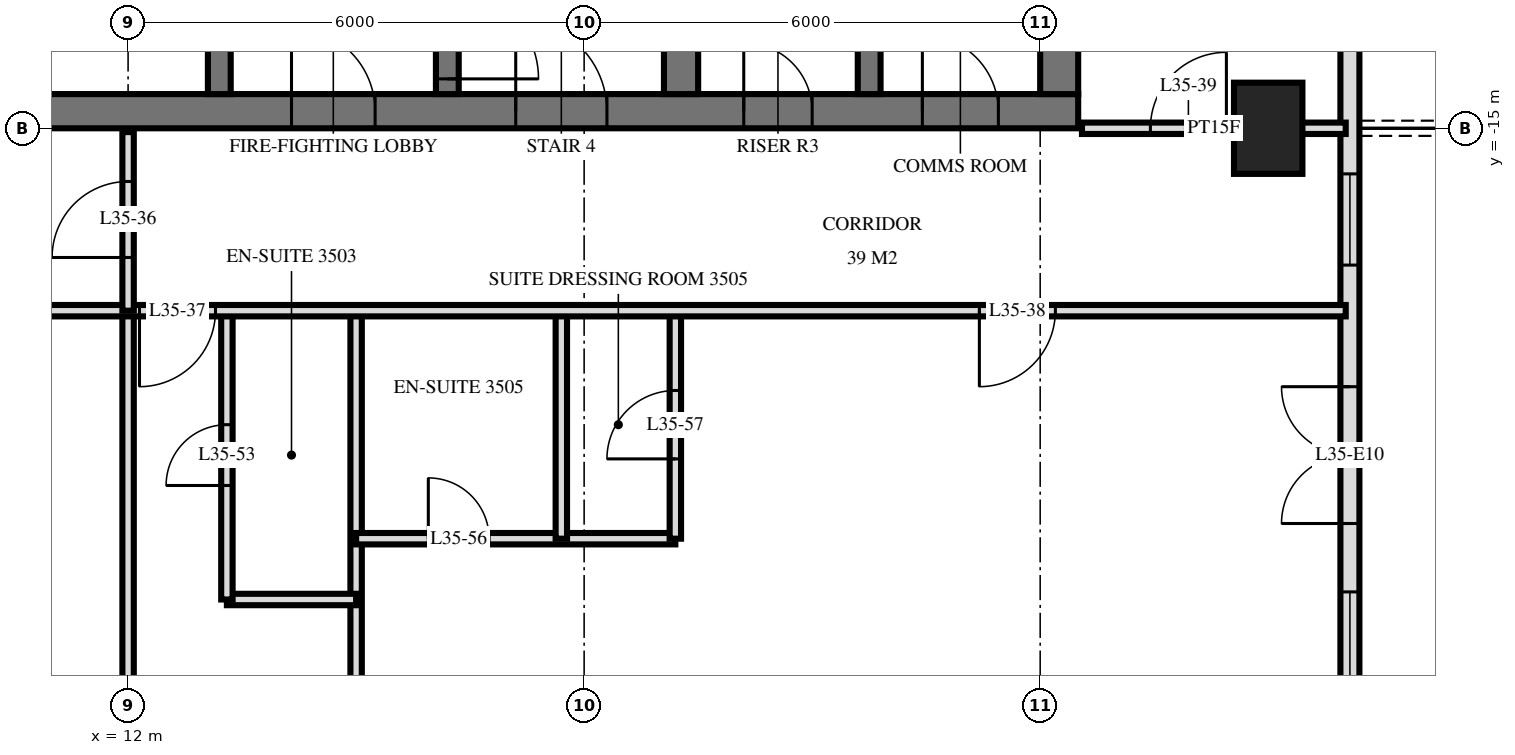
"""IFC4 building model, lengths in metres.
Left out: names, types, materials, properties, quantities, classifications, styles, units other than length and angle.
Written with IfcOpenShell. Run it as: python <this file> out.ifc"""

import sys

from ifc_helpers import new_model, si_unit, direction, frame, frame_2d, origin, origin_2d, place, context, subcontext, project, spatial, rectangle, extrude, element, fill, save


model = new_model("IFC4")
c1 = context("Model", 3, precision=1e-05, world=origin(), true_north=direction((0.0, 1.0)))
c2 = subcontext(c1, "Body", "Model", "MODEL_VIEW")
j1 = project(units=[si_unit("LENGTHUNIT", "METRE"), si_unit("PLANEANGLEUNIT", "RADIAN")], contexts=[c1])
p1 = place(None, origin())
s1 = spatial("IfcSite", under=j1, at=p1, CompositionType="ELEMENT")
p2 = place(p1, origin())
s2 = spatial("IfcBuilding", under=s1, at=p2, CompositionType="ELEMENT")
p3 = place(p2, frame((0.0, 0.0, 138.0)))
s3 = spatial("IfcBuildingStorey", under=s2, at=p3, CompositionType="ELEMENT", Elevation=138.0)
p4 = place(p3, frame((27.0, -15.0, 0.0), z_axis=(0.0, 0.0, 1.0), x_axis=(0.0, 1.0, 0.0)))
e1 = element("IfcColumn", 1, at=p4, inside=s3, PredefinedType="COLUMN", context=c2, shape_type="SweptSolid", body=[
    extrude(rectangle(XDim=1.2, YDim=0.9, at=origin_2d()), origin(), (0.0, 0.0, 1.0), 3.6),
])
p5 = place(p3, frame((10.0, -14.775, 0.0), z_axis=(0.0, 0.0, 1.0), x_axis=(1.0, 0.0, 0.0)))
e2 = element("IfcWall", 2, at=p5, inside=s3, PredefinedType="SHEAR", context=c2, shape_type="SweptSolid", body=[
    extrude(rectangle(XDim=14.5, YDim=0.45, at=frame_2d((7.25, 0.0))), origin(), (0.0, 0.0, 1.0), 3.6),
])
p6 = place(p5, frame((7.1, 0.0, 0.0)))
e3 = element("IfcOpeningElement", 3, at=p6, cuts=e2, PredefinedType="OPENING", context=c2, shape_type="SweptSolid", body=[
    extrude(rectangle(XDim=1.2, YDim=2.1, at=frame_2d((0.6, 1.05))), frame((0.0, 0.235, 0.0), z_axis=(0.0, -1.0, 0.0), x_axis=(1.0, 0.0, 0.0)), (0.0, 0.0, 1.0), 0.47),
])
p7 = place(p5, frame((4.15, 0.0, 0.0)))
e4 = element("IfcOpeningElement", 4, at=p7, cuts=e2, PredefinedType="OPENING", context=c2, shape_type="SweptSolid", body=[
    extrude(rectangle(XDim=1.1, YDim=2.1, at=frame_2d((0.55, 1.05))), frame((0.0, 0.235, 0.0), z_axis=(0.0, -1.0, 0.0), x_axis=(1.0, 0.0, 0.0)), (0.0, 0.0, 1.0), 0.47),
])
p8 = place(p5, frame((10.1, 0.0, 0.0)))
e5 = element("IfcOpeningElement", 5, at=p8, cuts=e2, PredefinedType="OPENING", context=c2, shape_type="SweptSolid", body=[
    extrude(rectangle(XDim=0.9, YDim=2.1, at=frame_2d((0.45, 1.05))), frame((0.0, 0.235, 0.0), z_axis=(0.0, -1.0, 0.0), x_axis=(1.0, 0.0, 0.0)), (0.0, 0.0, 1.0), 0.47),
])
p9 = place(p5, frame((12.45, 0.0, 0.0)))
e6 = element("IfcOpeningElement", 6, at=p9, cuts=e2, PredefinedType="OPENING", context=c2, shape_type="SweptSolid", body=[
    extrude(rectangle(XDim=1.0, YDim=2.1, at=frame_2d((0.5, 1.05))), frame((0.0, 0.235, 0.0), z_axis=(0.0, -1.0, 0.0), x_axis=(1.0, 0.0, 0.0)), (0.0, 0.0, 1.0), 0.47),
])
p10 = place(p3, frame((24.25, -14.55, 0.0), z_axis=(0.0, 0.0, 1.0), x_axis=(0.0, 1.0, 0.0)))
e7 = element("IfcWall", 7, at=p10, inside=s3, PredefinedType="SHEAR", context=c2, shape_type="SweptSolid", body=[
    extrude(rectangle(XDim=14.1, YDim=0.5, at=frame_2d((7.05, 0.0))), origin(), (0.0, 0.0, 1.0), 3.6),
])
p11 = place(p3, frame((13.2, -14.55, 0.0), z_axis=(0.0, 0.0, 1.0), x_axis=(0.0, 1.0, 0.0)))
e8 = element("IfcWall", 8, at=p11, inside=s3, PredefinedType="SHEAR", context=c2, shape_type="SweptSolid", body=[
    extrude(rectangle(XDim=5.4, YDim=0.3, at=frame_2d((2.7, 0.0))), origin(), (0.0, 0.0, 1.0), 3.6),
])
p12 = place(p11, frame((4.0, 0.0, 0.0)))
e9 = element("IfcOpeningElement", 9, at=p12, cuts=e8, PredefinedType="OPENING", context=c2, shape_type="SweptSolid", body=[
    extrude(rectangle(XDim=1.2, YDim=2.1, at=frame_2d((0.6, 1.05))), frame((0.0, 0.16, 0.0), z_axis=(0.0, -1.0, 0.0), x_axis=(1.0, 0.0, 0.0)), (0.0, 0.0, 1.0), 0.32),
])
p13 = place(p3, frame((16.2, -14.55, 0.0), z_axis=(0.0, 0.0, 1.0), x_axis=(0.0, 1.0, 0.0)))
e10 = element("IfcWall", 10, at=p13, inside=s3, PredefinedType="SHEAR", context=c2, shape_type="SweptSolid", body=[
    extrude(rectangle(XDim=5.4, YDim=0.3, at=frame_2d((2.7, 0.0))), origin(), (0.0, 0.0, 1.0), 3.6),
])
p14 = place(p13, frame((0.2, 0.0, 0.0)))
e11 = element("IfcOpeningElement", 11, at=p14, cuts=e10, PredefinedType="OPENING", context=c2, shape_type="SweptSolid", body=[
    extrude(rectangle(XDim=1.2, YDim=2.1, at=frame_2d((0.6, 1.05))), frame((0.0, 0.16, 0.0), z_axis=(0.0, -1.0, 0.0), x_axis=(1.0, 0.0, 0.0)), (0.0, 0.0, 1.0), 0.32),
])
p15 = place(p3, frame((19.275, -14.55, 0.0), z_axis=(0.0, 0.0, 1.0), x_axis=(0.0, 1.0, 0.0)))
e12 = element("IfcWall", 12, at=p15, inside=s3, PredefinedType="SHEAR", context=c2, shape_type="SweptSolid", body=[
    extrude(rectangle(XDim=5.4, YDim=0.45, at=frame_2d((2.7, 0.0))), origin(), (0.0, 0.0, 1.0), 3.6),
])
p16 = place(p3, frame((21.75, -14.55, 0.0), z_axis=(0.0, 0.0, 1.0), x_axis=(0.0, 1.0, 0.0)))
e13 = element("IfcWall", 13, at=p16, inside=s3, PredefinedType="SHEAR", context=c2, shape_type="SweptSolid", body=[
    extrude(rectangle(XDim=5.4, YDim=0.3, at=frame_2d((2.7, 0.0))), origin(), (0.0, 0.0, 1.0), 3.6),
])
p17 = place(p3, frame((28.075, -29.275, 0.0), z_axis=(0.0, 0.0, 1.0), x_axis=(0.0, 1.0, 0.0)))
e14 = element("IfcWall", 14, at=p17, inside=s3, PredefinedType="SOLIDWALL", context=c2, shape_type="SweptSolid", body=[
    extrude(rectangle(XDim=25.951, YDim=0.25, at=frame_2d((12.975, 0.0))), origin(), (0.0, 0.0, 1.0), 3.32),
])
p18 = place(p17, frame((0.575, 0.0, 0.0)))
e15 = element("IfcOpeningElement", 15, at=p18, cuts=e14, PredefinedType="OPENING", context=c2, shape_type="SweptSolid", body=[
    extrude(rectangle(XDim=1.8, YDim=2.4, at=frame_2d((0.9, 1.2))), frame((0.0, 0.135, 0.0), z_axis=(0.0, -1.0, 0.0), x_axis=(1.0, 0.0, 0.0)), (0.0, 0.0, 1.0), 0.27),
])
p19 = place(p17, frame((3.325, 0.0, 0.3)))
e16 = element("IfcOpeningElement", 16, at=p19, cuts=e14, PredefinedType="OPENING", context=c2, shape_type="SweptSolid", body=[
    extrude(rectangle(XDim=1.8, YDim=2.1, at=frame_2d((0.9, 1.05))), frame((0.0, 0.135, 0.0), z_axis=(0.0, -1.0, 0.0), x_axis=(1.0, 0.0, 0.0)), (0.0, 0.0, 1.0), 0.27),
])
p20 = place(p17, frame((5.775, 0.0, 0.3)))
e17 = element("IfcOpeningElement", 17, at=p20, cuts=e14, PredefinedType="OPENING", context=c2, shape_type="SweptSolid", body=[
    extrude(rectangle(XDim=2.4, YDim=2.1, at=frame_2d((1.2, 1.05))), frame((0.0, 0.135, 0.0), z_axis=(0.0, -1.0, 0.0), x_axis=(1.0, 0.0, 0.0)), (0.0, 0.0, 1.0), 0.27),
])
p21 = place(p17, frame((9.075, 0.0, 0.0)))
e18 = element("IfcOpeningElement", 18, at=p21, cuts=e14, PredefinedType="OPENING", context=c2, shape_type="SweptSolid", body=[
    extrude(rectangle(XDim=1.8, YDim=2.4, at=frame_2d((0.9, 1.2))), frame((0.0, 0.135, 0.0), z_axis=(0.0, -1.0, 0.0), x_axis=(1.0, 0.0, 0.0)), (0.0, 0.0, 1.0), 0.27),
])
p22 = place(p17, frame((12.475, 0.0, 0.3)))
e19 = element("IfcOpeningElement", 19, at=p22, cuts=e14, PredefinedType="OPENING", context=c2, shape_type="SweptSolid", body=[
    extrude(rectangle(XDim=1.2, YDim=2.1, at=frame_2d((0.6, 1.05))), frame((0.0, 0.135, 0.0), z_axis=(0.0, -1.0, 0.0), x_axis=(1.0, 0.0, 0.0)), (0.0, 0.0, 1.0), 0.27),
])
p23 = place(p17, frame((17.5, 0.0, 0.0)))
e20 = element("IfcOpeningElement", 20, at=p23, cuts=e14, PredefinedType="OPENING", context=c2, shape_type="SweptSolid", body=[
    extrude(rectangle(XDim=1.8, YDim=2.4, at=frame_2d((0.9, 1.2))), frame((0.0, 0.135, 0.0), z_axis=(0.0, -1.0, 0.0), x_axis=(1.0, 0.0, 0.0)), (0.0, 0.0, 1.0), 0.27),
])
p24 = place(p3, frame((19.2, -20.4, 0.0), z_axis=(0.0, 0.0, 1.0), x_axis=(0.0, 1.0, 0.0)))
e21 = element("IfcWall", 21, at=p24, inside=s3, PredefinedType="PARTITIONING", context=c2, shape_type="SweptSolid", body=[
    extrude(rectangle(XDim=3.0, YDim=0.15, at=frame_2d((1.5, 0.0))), origin(), (0.0, 0.0, 1.0), 3.32),
])
p25 = place(p24, frame((1.05, 0.0, 0.0)))
e22 = element("IfcOpeningElement", 22, at=p25, cuts=e21, PredefinedType="OPENING", context=c2, shape_type="SweptSolid", body=[
    extrude(rectangle(XDim=0.9, YDim=2.1, at=frame_2d((0.45, 1.05))), frame((0.0, 0.085, 0.0), z_axis=(0.0, -1.0, 0.0), x_axis=(1.0, 0.0, 0.0)), (0.0, 0.0, 1.0), 0.17),
])
p26 = place(p3, frame((17.7, -20.4, 0.0), z_axis=(0.0, 0.0, 1.0), x_axis=(0.0, 1.0, 0.0)))
e23 = element("IfcWall", 23, at=p26, inside=s3, PredefinedType="PARTITIONING", context=c2, shape_type="SweptSolid", body=[
    extrude(rectangle(XDim=3.0, YDim=0.15, at=frame_2d((1.5, 0.0))), origin(), (0.0, 0.0, 1.0), 3.32),
])
p27 = place(p3, frame((15.0, -33.62, 0.0), z_axis=(0.0, 0.0, 1.0), x_axis=(0.0, 1.0, 0.0)))
e24 = element("IfcWall", 24, at=p27, inside=s3, PredefinedType="PARTITIONING", context=c2, shape_type="SweptSolid", body=[
    extrude(rectangle(XDim=16.22, YDim=0.15, at=frame_2d((8.11, 0.0))), origin(), (0.0, 0.0, 1.0), 3.32),
])
p28 = place(p3, frame((13.3, -21.2, 0.0), z_axis=(0.0, 0.0, 1.0), x_axis=(0.0, 1.0, 0.0)))
e25 = element("IfcWall", 25, at=p28, inside=s3, PredefinedType="PARTITIONING", context=c2, shape_type="SweptSolid", body=[
    extrude(rectangle(XDim=3.8, YDim=0.15, at=frame_2d((1.9, 0.0))), origin(), (0.0, 0.0, 1.0), 3.32),
])
p29 = place(p28, frame((1.5, 0.0, 0.0)))
e26 = element("IfcOpeningElement", 26, at=p29, cuts=e25, PredefinedType="OPENING", context=c2, shape_type="SweptSolid", body=[
    extrude(rectangle(XDim=0.8, YDim=2.1, at=frame_2d((0.4, 1.05))), frame((0.0, 0.085, 0.0), z_axis=(0.0, -1.0, 0.0), x_axis=(1.0, 0.0, 0.0)), (0.0, 0.0, 1.0), 0.17),
])
p30 = place(p3, frame((12.0, -17.4, 0.0), z_axis=(0.0, 0.0, 1.0), x_axis=(0.0, 1.0, 0.0)))
e27 = element("IfcWall", 27, at=p30, inside=s3, PredefinedType="PARTITIONING", context=c2, shape_type="SweptSolid", body=[
    extrude(rectangle(XDim=2.35, YDim=0.15, at=frame_2d((1.175, 0.0))), origin(), (0.0, 0.0, 1.0), 3.32),
])
p31 = place(p30, frame((0.7, 0.0, 0.0)))
e28 = element("IfcOpeningElement", 28, at=p31, cuts=e27, PredefinedType="OPENING", context=c2, shape_type="SweptSolid", body=[
    extrude(rectangle(XDim=1.0, YDim=2.1, at=frame_2d((0.5, 1.05))), frame((0.0, 0.085, 0.0), z_axis=(0.0, -1.0, 0.0), x_axis=(1.0, 0.0, 0.0)), (0.0, 0.0, 1.0), 0.17),
])
p32 = place(p3, frame((12.0, -33.62, 0.0), z_axis=(0.0, 0.0, 1.0), x_axis=(0.0, 1.0, 0.0)))
e29 = element("IfcWall", 29, at=p32, inside=s3, PredefinedType="PARTITIONING", context=c2, shape_type="SweptSolid", body=[
    extrude(rectangle(XDim=16.22, YDim=0.15, at=frame_2d((8.11, 0.0))), origin(), (0.0, 0.0, 1.0), 3.32),
])
p33 = place(p3, frame((13.3, -21.2, 0.0), z_axis=(0.0, 0.0, 1.0), x_axis=(1.0, 0.0, 0.0)))
e30 = element("IfcWall", 30, at=p33, inside=s3, PredefinedType="PARTITIONING", context=c2, shape_type="SweptSolid", body=[
    extrude(rectangle(XDim=1.7, YDim=0.15, at=frame_2d((0.85, 0.0))), origin(), (0.0, 0.0, 1.0), 3.32),
])
p34 = place(p3, frame((15.0, -20.4, 0.0), z_axis=(0.0, 0.0, 1.0), x_axis=(1.0, 0.0, 0.0)))
e31 = element("IfcWall", 31, at=p34, inside=s3, PredefinedType="PARTITIONING", context=c2, shape_type="SweptSolid", body=[
    extrude(rectangle(XDim=4.2, YDim=0.15, at=frame_2d((2.1, 0.0))), origin(), (0.0, 0.0, 1.0), 3.32),
])
p35 = place(p34, frame((0.95, 0.0, 0.0)))
e32 = element("IfcOpeningElement", 32, at=p35, cuts=e31, PredefinedType="OPENING", context=c2, shape_type="SweptSolid", body=[
    extrude(rectangle(XDim=0.8, YDim=2.1, at=frame_2d((0.4, 1.05))), frame((0.0, 0.085, 0.0), z_axis=(0.0, -1.0, 0.0), x_axis=(1.0, 0.0, 0.0)), (0.0, 0.0, 1.0), 0.17),
])
p36 = place(p3, frame((-28.02, -17.4, 0.0), z_axis=(0.0, 0.0, 1.0), x_axis=(1.0, 0.0, 0.0)))
e33 = element("IfcWall", 33, at=p36, inside=s3, PredefinedType="PARTITIONING", context=c2, shape_type="SweptSolid", body=[
    extrude(rectangle(XDim=56.04, YDim=0.15, at=frame_2d((28.02, 0.0))), origin(), (0.0, 0.0, 1.0), 3.32),
])
p37 = place(p36, frame((13.17, 0.0, 0.0)))
e34 = element("IfcOpeningElement", 34, at=p37, cuts=e33, PredefinedType="OPENING", context=c2, shape_type="SweptSolid", body=[
    extrude(rectangle(XDim=1.0, YDim=2.1, at=frame_2d((0.5, 1.05))), frame((0.0, 0.085, 0.0), z_axis=(0.0, -1.0, 0.0), x_axis=(1.0, 0.0, 0.0)), (0.0, 0.0, 1.0), 0.17),
])
p38 = place(p36, frame((11.87, 0.0, 0.0)))
e35 = element("IfcOpeningElement", 35, at=p38, cuts=e33, PredefinedType="OPENING", context=c2, shape_type="SweptSolid", body=[
    extrude(rectangle(XDim=1.0, YDim=2.1, at=frame_2d((0.5, 1.05))), frame((0.0, 0.085, 0.0), z_axis=(0.0, -1.0, 0.0), x_axis=(1.0, 0.0, 0.0)), (0.0, 0.0, 1.0), 0.17),
])
p39 = place(p36, frame((2.32, 0.0, 0.0)))
e36 = element("IfcOpeningElement", 36, at=p39, cuts=e33, PredefinedType="OPENING", context=c2, shape_type="SweptSolid", body=[
    extrude(rectangle(XDim=1.0, YDim=2.1, at=frame_2d((0.5, 1.05))), frame((0.0, 0.085, 0.0), z_axis=(0.0, -1.0, 0.0), x_axis=(1.0, 0.0, 0.0)), (0.0, 0.0, 1.0), 0.17),
])
p40 = place(p36, frame((40.17, 0.0, 0.0)))
e37 = element("IfcOpeningElement", 37, at=p40, cuts=e33, PredefinedType="OPENING", context=c2, shape_type="SweptSolid", body=[
    extrude(rectangle(XDim=1.0, YDim=2.1, at=frame_2d((0.5, 1.05))), frame((0.0, 0.085, 0.0), z_axis=(0.0, -1.0, 0.0), x_axis=(1.0, 0.0, 0.0)), (0.0, 0.0, 1.0), 0.17),
])
p41 = place(p36, frame((51.22, 0.0, 0.0)))
e38 = element("IfcOpeningElement", 38, at=p41, cuts=e33, PredefinedType="OPENING", context=c2, shape_type="SweptSolid", body=[
    extrude(rectangle(XDim=1.0, YDim=2.1, at=frame_2d((0.5, 1.05))), frame((0.0, 0.085, 0.0), z_axis=(0.0, -1.0, 0.0), x_axis=(1.0, 0.0, 0.0)), (0.0, 0.0, 1.0), 0.17),
])
p42 = place(p36, frame((18.52, 0.0, 0.0)))
e39 = element("IfcOpeningElement", 39, at=p42, cuts=e33, PredefinedType="OPENING", context=c2, shape_type="SweptSolid", body=[
    extrude(rectangle(XDim=1.0, YDim=2.1, at=frame_2d((0.5, 1.05))), frame((0.0, 0.085, 0.0), z_axis=(0.0, -1.0, 0.0), x_axis=(1.0, 0.0, 0.0)), (0.0, 0.0, 1.0), 0.17),
])
p43 = place(p36, frame((26.02, 0.0, 0.0)))
e40 = element("IfcOpeningElement", 40, at=p43, cuts=e33, PredefinedType="OPENING", context=c2, shape_type="SweptSolid", body=[
    extrude(rectangle(XDim=1.0, YDim=2.1, at=frame_2d((0.5, 1.05))), frame((0.0, 0.085, 0.0), z_axis=(0.0, -1.0, 0.0), x_axis=(1.0, 0.0, 0.0)), (0.0, 0.0, 1.0), 0.17),
])
p44 = place(p36, frame((35.02, 0.0, 0.0)))
e41 = element("IfcOpeningElement", 41, at=p44, cuts=e33, PredefinedType="OPENING", context=c2, shape_type="SweptSolid", body=[
    extrude(rectangle(XDim=1.0, YDim=2.1, at=frame_2d((0.5, 1.05))), frame((0.0, 0.085, 0.0), z_axis=(0.0, -1.0, 0.0), x_axis=(1.0, 0.0, 0.0)), (0.0, 0.0, 1.0), 0.17),
])
p45 = place(p3, frame((24.55, -15.0, 0.0), z_axis=(0.0, 0.0, 1.0), x_axis=(1.0, 0.0, 0.0)))
e42 = element("IfcWall", 42, at=p45, inside=s3, PredefinedType="PARTITIONING", context=c2, shape_type="SweptSolid", body=[
    extrude(rectangle(XDim=3.47, YDim=0.15, at=frame_2d((1.735, 0.0))), origin(), (0.0, 0.0, 1.0), 3.32),
])
p46 = place(p45, frame((0.9, 0.0, 0.0)))
e43 = element("IfcOpeningElement", 43, at=p46, cuts=e42, PredefinedType="OPENING", context=c2, shape_type="SweptSolid", body=[
    extrude(rectangle(XDim=1.0, YDim=2.1, at=frame_2d((0.5, 1.05))), frame((0.0, 0.085, 0.0), z_axis=(0.0, -1.0, 0.0), x_axis=(1.0, 0.0, 0.0)), (0.0, 0.0, 1.0), 0.17),
])
p47 = place(p20, origin())
e44 = element("IfcWindow", 44, at=p47, inside=s3, PartitioningType="SINGLE_PANEL", PredefinedType="WINDOW", context=c2, shape_type="SweptSolid", body=[
    extrude(rectangle(XDim=2.4, YDim=2.1, at=frame_2d((1.2, 1.05))), frame((0.0, 0.03, 0.0), z_axis=(0.0, -1.0, 0.0), x_axis=(1.0, 0.0, 0.0)), (0.0, 0.0, 1.0), 0.06),
])
fill(e17, e44)
p48 = place(p21, origin())
e45 = element("IfcDoor", 45, at=p48, inside=s3, OperationType="DOUBLE_DOOR_SINGLE_SWING", PredefinedType="DOOR", context=c2, shape_type="SweptSolid", body=[
    extrude(rectangle(XDim=1.8, YDim=2.4, at=frame_2d((0.9, 1.2))), frame((0.0, 0.025, 0.0), z_axis=(0.0, -1.0, 0.0), x_axis=(1.0, 0.0, 0.0)), (0.0, 0.0, 1.0), 0.05),
])
fill(e18, e45)
p49 = place(p22, origin())
e46 = element("IfcWindow", 46, at=p49, inside=s3, PartitioningType="SINGLE_PANEL", PredefinedType="WINDOW", context=c2, shape_type="SweptSolid", body=[
    extrude(rectangle(XDim=1.2, YDim=2.1, at=frame_2d((0.6, 1.05))), frame((0.0, 0.03, 0.0), z_axis=(0.0, -1.0, 0.0), x_axis=(1.0, 0.0, 0.0)), (0.0, 0.0, 1.0), 0.06),
])
fill(e19, e46)
p50 = place(p6, origin())
e47 = element("IfcDoor", 47, at=p50, inside=s3, OperationType="SINGLE_SWING_RIGHT", PredefinedType="DOOR", context=c2, shape_type="SweptSolid", body=[
    extrude(rectangle(XDim=1.2, YDim=2.1, at=frame_2d((0.6, 1.05))), frame((0.0, 0.025, 0.0), z_axis=(0.0, -1.0, 0.0), x_axis=(1.0, 0.0, 0.0)), (0.0, 0.0, 1.0), 0.05),
])
fill(e3, e47)
p51 = place(p7, origin())
e48 = element("IfcDoor", 48, at=p51, inside=s3, OperationType="SINGLE_SWING_RIGHT", PredefinedType="DOOR", context=c2, shape_type="SweptSolid", body=[
    extrude(rectangle(XDim=1.1, YDim=2.1, at=frame_2d((0.55, 1.05))), frame((0.0, 0.025, 0.0), z_axis=(0.0, -1.0, 0.0), x_axis=(1.0, 0.0, 0.0)), (0.0, 0.0, 1.0), 0.05),
])
fill(e4, e48)
p52 = place(p8, origin())
e49 = element("IfcDoor", 49, at=p52, inside=s3, OperationType="SINGLE_SWING_RIGHT", PredefinedType="DOOR", context=c2, shape_type="SweptSolid", body=[
    extrude(rectangle(XDim=0.9, YDim=2.1, at=frame_2d((0.45, 1.05))), frame((0.0, 0.025, 0.0), z_axis=(0.0, -1.0, 0.0), x_axis=(1.0, 0.0, 0.0)), (0.0, 0.0, 1.0), 0.05),
])
fill(e5, e49)
p53 = place(p9, origin())
e50 = element("IfcDoor", 50, at=p53, inside=s3, OperationType="SINGLE_SWING_RIGHT", PredefinedType="DOOR", context=c2, shape_type="SweptSolid", body=[
    extrude(rectangle(XDim=1.0, YDim=2.1, at=frame_2d((0.5, 1.05))), frame((0.0, 0.025, 0.0), z_axis=(0.0, -1.0, 0.0), x_axis=(1.0, 0.0, 0.0)), (0.0, 0.0, 1.0), 0.05),
])
fill(e6, e50)
p54 = place(p14, frame((0.6, 0.0, 0.0), z_axis=(0.0, 0.0, 1.0), x_axis=(-1.0, 0.0, 0.0)))
e51 = element("IfcDoor", 51, at=p54, inside=s3, OperationType="SINGLE_SWING_LEFT", PredefinedType="DOOR", context=c2, shape_type="SweptSolid", body=[
    extrude(rectangle(XDim=1.2, YDim=2.1, at=frame_2d((0.0, 1.05))), frame((0.0, -0.025, 0.0), z_axis=(0.0, 1.0, 0.0), x_axis=(-1.0, 0.0, 0.0)), (0.0, 0.0, 1.0), 0.05),
])
fill(e11, e51)
p55 = place(p31, origin())
e52 = element("IfcDoor", 52, at=p55, inside=s3, OperationType="SINGLE_SWING_RIGHT", PredefinedType="DOOR", context=c2, shape_type="SweptSolid", body=[
    extrude(rectangle(XDim=1.0, YDim=2.1, at=frame_2d((0.5, 1.05))), frame((0.0, 0.025, 0.0), z_axis=(0.0, -1.0, 0.0), x_axis=(1.0, 0.0, 0.0)), (0.0, 0.0, 1.0), 0.05),
])
fill(e28, e52)
p56 = place(p40, frame((0.5, 0.0, 0.0), z_axis=(0.0, 0.0, 1.0), x_axis=(-1.0, 0.0, 0.0)))
e53 = element("IfcDoor", 53, at=p56, inside=s3, OperationType="SINGLE_SWING_LEFT", PredefinedType="DOOR", context=c2, shape_type="SweptSolid", body=[
    extrude(rectangle(XDim=1.0, YDim=2.1, at=frame_2d((0.0, 1.05))), frame((0.0, -0.025, 0.0), z_axis=(0.0, 1.0, 0.0), x_axis=(-1.0, 0.0, 0.0)), (0.0, 0.0, 1.0), 0.05),
])
fill(e37, e53)
p57 = place(p41, frame((0.5, 0.0, 0.0), z_axis=(0.0, 0.0, 1.0), x_axis=(-1.0, 0.0, 0.0)))
e54 = element("IfcDoor", 54, at=p57, inside=s3, OperationType="SINGLE_SWING_LEFT", PredefinedType="DOOR", context=c2, shape_type="SweptSolid", body=[
    extrude(rectangle(XDim=1.0, YDim=2.1, at=frame_2d((0.0, 1.05))), frame((0.0, -0.025, 0.0), z_axis=(0.0, 1.0, 0.0), x_axis=(-1.0, 0.0, 0.0)), (0.0, 0.0, 1.0), 0.05),
])
fill(e38, e54)
p58 = place(p46, origin())
e55 = element("IfcDoor", 55, at=p58, inside=s3, OperationType="SINGLE_SWING_LEFT", PredefinedType="DOOR", context=c2, shape_type="SweptSolid", body=[
    extrude(rectangle(XDim=1.0, YDim=2.1, at=frame_2d((0.5, 1.05))), frame((0.0, 0.025, 0.0), z_axis=(0.0, -1.0, 0.0), x_axis=(1.0, 0.0, 0.0)), (0.0, 0.0, 1.0), 0.05),
])
fill(e43, e55)
p59 = place(p29, origin())
e56 = element("IfcDoor", 56, at=p59, inside=s3, OperationType="SINGLE_SWING_RIGHT", PredefinedType="DOOR", context=c2, shape_type="SweptSolid", body=[
    extrude(rectangle(XDim=0.8, YDim=2.1, at=frame_2d((0.4, 1.05))), frame((0.0, 0.025, 0.0), z_axis=(0.0, -1.0, 0.0), x_axis=(1.0, 0.0, 0.0)), (0.0, 0.0, 1.0), 0.05),
])
fill(e26, e56)
p60 = place(p35, origin())
e57 = element("IfcDoor", 57, at=p60, inside=s3, OperationType="SINGLE_SWING_RIGHT", PredefinedType="DOOR", context=c2, shape_type="SweptSolid", body=[
    extrude(rectangle(XDim=0.8, YDim=2.1, at=frame_2d((0.4, 1.05))), frame((0.0, 0.025, 0.0), z_axis=(0.0, -1.0, 0.0), x_axis=(1.0, 0.0, 0.0)), (0.0, 0.0, 1.0), 0.05),
])
fill(e32, e57)
p61 = place(p25, origin())
e58 = element("IfcDoor", 58, at=p61, inside=s3, OperationType="SINGLE_SWING_RIGHT", PredefinedType="DOOR", context=c2, shape_type="SweptSolid", body=[
    extrude(rectangle(XDim=0.9, YDim=2.1, at=frame_2d((0.45, 1.05))), frame((0.0, 0.025, 0.0), z_axis=(0.0, -1.0, 0.0), x_axis=(1.0, 0.0, 0.0)), (0.0, 0.0, 1.0), 0.05),
])
fill(e22, e58)
save(model, sys.argv[1])
